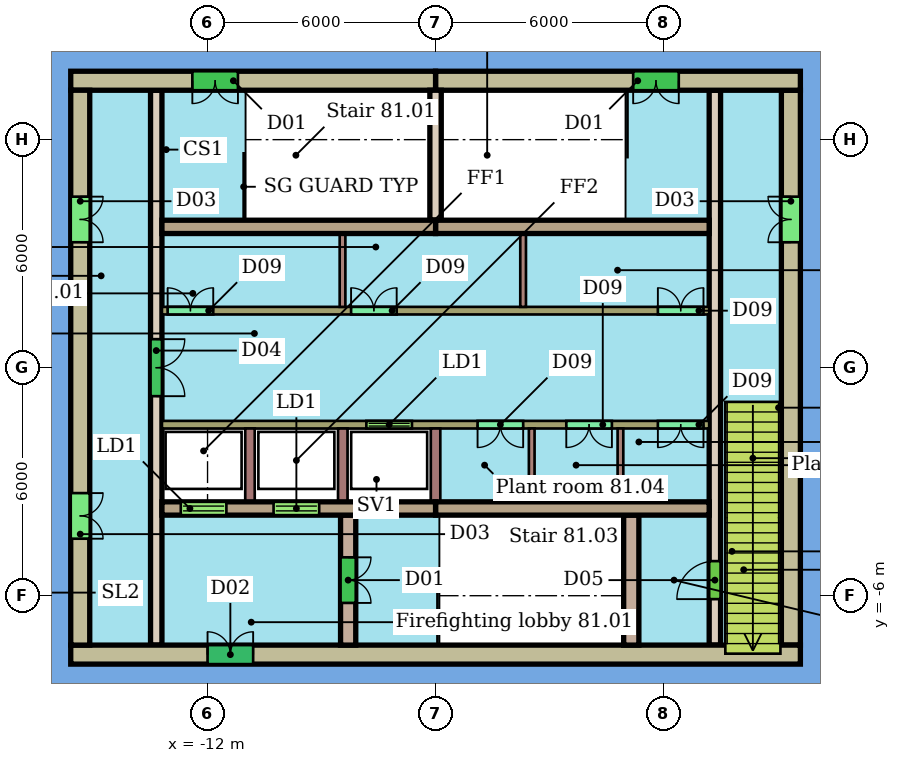
"""IFC4 building model, lengths in metres.
Left out: names, types, materials, properties, quantities, classifications, styles, units other than length and angle.
Written with IfcOpenShell. Run it as: python <this file> out.ifc"""

import sys

from ifc_helpers import new_model, si_unit, direction, frame, frame_2d, origin, place, context, subcontext, project, spatial, rectangle, extrude, element, fill, save


model = new_model("IFC4")
c1 = context("Model", 3, precision=1e-05, world=origin(), true_north=direction((0.0, 1.0)))
c2 = subcontext(c1, "Body", "Model", "MODEL_VIEW")
j1 = project(units=[si_unit("LENGTHUNIT", "METRE"), si_unit("PLANEANGLEUNIT", "RADIAN")], contexts=[c1])
p1 = place(None, origin())
s1 = spatial("IfcSite", under=j1, at=p1, CompositionType="ELEMENT")
p2 = place(p1, origin())
s2 = spatial("IfcBuilding", under=s1, at=p2, CompositionType="ELEMENT")
p3 = place(p2, frame((0.0, 0.0, 325.5)))
s3 = spatial("IfcBuildingStorey", under=s2, at=p3, CompositionType="ELEMENT", Elevation=325.5)
p4 = place(p3, frame((3.6, 7.55, 0.0), z_axis=(0.0, 0.0, 1.0), x_axis=(-1.0, 0.0, 0.0)))
e1 = element("IfcWall", 1, at=p4, inside=s3, PredefinedType="SHEAR", context=c2, shape_type="SweptSolid", body=[
    extrude(rectangle(XDim=9.6, YDim=0.5, at=frame_2d((4.8, 0.0))), origin(), (0.0, 0.0, 1.0), 3.75),
])
p5 = place(p4, frame((3.2, 0.0, 0.0)))
e2 = element("IfcOpeningElement", 2, at=p5, cuts=e1, PredefinedType="OPENING", context=c2, shape_type="SweptSolid", body=[
    extrude(rectangle(XDim=1.2, YDim=2.1, at=frame_2d((0.6, 1.05))), frame((0.0, 0.26, 0.0), z_axis=(0.0, -1.0, 0.0), x_axis=(1.0, 0.0, 0.0)), (0.0, 0.0, 1.0), 0.52),
])
p6 = place(p3, frame((-6.0, 7.55, 0.0), z_axis=(0.0, 0.0, 1.0), x_axis=(-1.0, 0.0, 0.0)))
e3 = element("IfcWall", 3, at=p6, inside=s3, PredefinedType="SHEAR", context=c2, shape_type="SweptSolid", body=[
    extrude(rectangle(XDim=9.6, YDim=0.5, at=frame_2d((4.8, 0.0))), origin(), (0.0, 0.0, 1.0), 3.75),
])
p7 = place(p6, frame((5.2, 0.0, 0.0)))
e4 = element("IfcOpeningElement", 4, at=p7, cuts=e3, PredefinedType="OPENING", context=c2, shape_type="SweptSolid", body=[
    extrude(rectangle(XDim=1.2, YDim=2.1, at=frame_2d((0.6, 1.05))), frame((0.0, 0.26, 0.0), z_axis=(0.0, -1.0, 0.0), x_axis=(1.0, 0.0, 0.0)), (0.0, 0.0, 1.0), 0.52),
])
p8 = place(p3, frame((-15.6, -7.55, 0.0), z_axis=(0.0, 0.0, 1.0), x_axis=(1.0, 0.0, 0.0)))
e5 = element("IfcWall", 5, at=p8, inside=s3, PredefinedType="SHEAR", context=c2, shape_type="SweptSolid", body=[
    extrude(rectangle(XDim=19.2, YDim=0.5, at=frame_2d((9.6, 0.0))), origin(), (0.0, 0.0, 1.0), 3.75),
])
p9 = place(p8, frame((3.6, 0.0, 0.0)))
e6 = element("IfcOpeningElement", 6, at=p9, cuts=e5, PredefinedType="OPENING", context=c2, shape_type="SweptSolid", body=[
    extrude(rectangle(XDim=1.2, YDim=2.1, at=frame_2d((0.6, 1.05))), frame((0.0, 0.26, 0.0), z_axis=(0.0, -1.0, 0.0), x_axis=(1.0, 0.0, 0.0)), (0.0, 0.0, 1.0), 0.52),
])
p10 = place(p3, frame((-15.35, 7.3, 0.0), z_axis=(0.0, 0.0, 1.0), x_axis=(0.0, -1.0, 0.0)))
e7 = element("IfcWall", 7, at=p10, inside=s3, PredefinedType="SHEAR", context=c2, shape_type="SweptSolid", body=[
    extrude(rectangle(XDim=14.6, YDim=0.5, at=frame_2d((7.3, 0.0))), origin(), (0.0, 0.0, 1.0), 3.75),
])
p11 = place(p10, frame((10.6, 0.0, 0.0)))
e8 = element("IfcOpeningElement", 8, at=p11, cuts=e7, PredefinedType="OPENING", context=c2, shape_type="SweptSolid", body=[
    extrude(rectangle(XDim=1.2, YDim=2.1, at=frame_2d((0.6, 1.05))), frame((0.0, 0.26, 0.0), z_axis=(0.0, -1.0, 0.0), x_axis=(1.0, 0.0, 0.0)), (0.0, 0.0, 1.0), 0.52),
])
p12 = place(p10, frame((2.8, 0.0, 0.0)))
e9 = element("IfcOpeningElement", 9, at=p12, cuts=e7, PredefinedType="OPENING", context=c2, shape_type="SweptSolid", body=[
    extrude(rectangle(XDim=1.2, YDim=2.1, at=frame_2d((0.6, 1.05))), frame((0.0, 0.26, 0.0), z_axis=(0.0, -1.0, 0.0), x_axis=(1.0, 0.0, 0.0)), (0.0, 0.0, 1.0), 0.52),
])
p13 = place(p3, frame((3.35, -7.3, 0.0), z_axis=(0.0, 0.0, 1.0), x_axis=(0.0, 1.0, 0.0)))
e10 = element("IfcWall", 10, at=p13, inside=s3, PredefinedType="SHEAR", context=c2, shape_type="SweptSolid", body=[
    extrude(rectangle(XDim=14.6, YDim=0.5, at=frame_2d((7.3, 0.0))), origin(), (0.0, 0.0, 1.0), 3.75),
])
p14 = place(p13, frame((10.6, 0.0, 0.0)))
e11 = element("IfcOpeningElement", 11, at=p14, cuts=e10, PredefinedType="OPENING", context=c2, shape_type="SweptSolid", body=[
    extrude(rectangle(XDim=1.2, YDim=2.1, at=frame_2d((0.6, 1.05))), frame((0.0, 0.26, 0.0), z_axis=(0.0, -1.0, 0.0), x_axis=(1.0, 0.0, 0.0)), (0.0, 0.0, 1.0), 0.52),
])
for number, where, z_axis, x_axis in (
    (12, (-13.2, 3.705, 0.0), (0.0, 0.0, 1.0), (1.0, 0.0, 0.0)),
    (13, (-6.0, 3.705, 0.0), (0.0, 0.0, 1.0), (1.0, 0.0, 0.0)),
):
    element("IfcWall", number, at=place(p3, frame(where, z_axis=z_axis, x_axis=x_axis)), inside=s3, PredefinedType="SHEAR", context=c2, shape_type="SweptSolid", body=[
        extrude(rectangle(XDim=7.2, YDim=0.35, at=frame_2d((3.6, 0.0))), origin(), (0.0, 0.0, 1.0), 3.75),
    ])
p15 = place(p3, frame((-13.2, -3.705, 0.0), z_axis=(0.0, 0.0, 1.0), x_axis=(1.0, 0.0, 0.0)))
e14 = element("IfcWall", 14, at=p15, inside=s3, PredefinedType="SHEAR", context=c2, shape_type="SweptSolid", body=[
    extrude(rectangle(XDim=7.2, YDim=0.35, at=frame_2d((3.6, 0.0))), origin(), (0.0, 0.0, 1.0), 3.75),
])
p16 = place(p15, frame((0.496, 0.0, 0.0)))
e15 = element("IfcOpeningElement", 15, at=p16, cuts=e14, PredefinedType="OPENING", context=c2, shape_type="SweptSolid", body=[
    extrude(rectangle(XDim=1.2, YDim=2.1, at=frame_2d((0.6, 1.05))), frame((0.0, 0.185, 0.0), z_axis=(0.0, -1.0, 0.0), x_axis=(1.0, 0.0, 0.0)), (0.0, 0.0, 1.0), 0.37),
])
p17 = place(p15, frame((2.938, 0.0, 0.0)))
e16 = element("IfcOpeningElement", 16, at=p17, cuts=e14, PredefinedType="OPENING", context=c2, shape_type="SweptSolid", body=[
    extrude(rectangle(XDim=1.2, YDim=2.1, at=frame_2d((0.6, 1.05))), frame((0.0, 0.185, 0.0), z_axis=(0.0, -1.0, 0.0), x_axis=(1.0, 0.0, 0.0)), (0.0, 0.0, 1.0), 0.37),
])
p18 = place(p3, frame((-6.0, -3.705, 0.0), z_axis=(0.0, 0.0, 1.0), x_axis=(1.0, 0.0, 0.0)))
e17 = element("IfcWall", 17, at=p18, inside=s3, PredefinedType="SHEAR", context=c2, shape_type="SweptSolid", body=[
    extrude(rectangle(XDim=7.2, YDim=0.35, at=frame_2d((3.6, 0.0))), origin(), (0.0, 0.0, 1.0), 3.75),
])
p19 = place(p3, frame((-13.35, 7.3, 0.0), z_axis=(0.0, 0.0, 1.0), x_axis=(0.0, -1.0, 0.0)))
e18 = element("IfcWall", 18, at=p19, inside=s3, PredefinedType="SHEAR", context=c2, shape_type="SweptSolid", body=[
    extrude(rectangle(XDim=14.6, YDim=0.3, at=frame_2d((7.3, 0.0))), origin(), (0.0, 0.0, 1.0), 3.75),
])
p20 = place(p19, frame((6.55, 0.0, 0.0)))
e19 = element("IfcOpeningElement", 19, at=p20, cuts=e18, PredefinedType="OPENING", context=c2, shape_type="SweptSolid", body=[
    extrude(rectangle(XDim=1.5, YDim=2.1, at=frame_2d((0.75, 1.05))), frame((0.0, 0.16, 0.0), z_axis=(0.0, -1.0, 0.0), x_axis=(1.0, 0.0, 0.0)), (0.0, 0.0, 1.0), 0.32),
])
p21 = place(p3, frame((1.35, -7.3, 0.0), z_axis=(0.0, 0.0, 1.0), x_axis=(0.0, 1.0, 0.0)))
e20 = element("IfcWall", 20, at=p21, inside=s3, PredefinedType="SHEAR", context=c2, shape_type="SweptSolid", body=[
    extrude(rectangle(XDim=14.6, YDim=0.3, at=frame_2d((7.3, 0.0))), origin(), (0.0, 0.0, 1.0), 3.75),
])
p22 = place(p21, frame((1.21, 0.0, 0.0)))
e21 = element("IfcOpeningElement", 21, at=p22, cuts=e20, PredefinedType="OPENING", context=c2, shape_type="SweptSolid", body=[
    extrude(rectangle(XDim=1.0, YDim=2.1, at=frame_2d((0.5, 1.05))), frame((0.0, 0.16, 0.0), z_axis=(0.0, -1.0, 0.0), x_axis=(1.0, 0.0, 0.0)), (0.0, 0.0, 1.0), 0.32),
])
p23 = place(p3, frame((-13.2, 1.5, 0.0), z_axis=(0.0, 0.0, 1.0), x_axis=(1.0, 0.0, 0.0)))
e22 = element("IfcWall", 22, at=p23, inside=s3, PredefinedType="SHEAR", context=c2, shape_type="SweptSolid", body=[
    extrude(rectangle(XDim=14.4, YDim=0.2, at=frame_2d((7.2, 0.0))), origin(), (0.0, 0.0, 1.0), 3.75),
])
p24 = place(p23, frame((0.15, 0.0, 0.0)))
e23 = element("IfcOpeningElement", 23, at=p24, cuts=e22, PredefinedType="OPENING", context=c2, shape_type="SweptSolid", body=[
    extrude(rectangle(XDim=1.2, YDim=2.4, at=frame_2d((0.6, 1.2))), frame((0.0, 0.11, 0.0), z_axis=(0.0, -1.0, 0.0), x_axis=(1.0, 0.0, 0.0)), (0.0, 0.0, 1.0), 0.22),
])
p25 = place(p23, frame((4.977, 0.0, 0.0)))
e24 = element("IfcOpeningElement", 24, at=p25, cuts=e22, PredefinedType="OPENING", context=c2, shape_type="SweptSolid", body=[
    extrude(rectangle(XDim=1.2, YDim=2.4, at=frame_2d((0.6, 1.2))), frame((0.0, 0.11, 0.0), z_axis=(0.0, -1.0, 0.0), x_axis=(1.0, 0.0, 0.0)), (0.0, 0.0, 1.0), 0.22),
])
p26 = place(p23, frame((13.05, 0.0, 0.0)))
e25 = element("IfcOpeningElement", 25, at=p26, cuts=e22, PredefinedType="OPENING", context=c2, shape_type="SweptSolid", body=[
    extrude(rectangle(XDim=1.2, YDim=2.4, at=frame_2d((0.6, 1.2))), frame((0.0, 0.11, 0.0), z_axis=(0.0, -1.0, 0.0), x_axis=(1.0, 0.0, 0.0)), (0.0, 0.0, 1.0), 0.22),
])
p27 = place(p3, frame((1.2, -1.5, 0.0), z_axis=(0.0, 0.0, 1.0), x_axis=(-1.0, 0.0, 0.0)))
e26 = element("IfcWall", 26, at=p27, inside=s3, PredefinedType="SHEAR", context=c2, shape_type="SweptSolid", body=[
    extrude(rectangle(XDim=14.4, YDim=0.2, at=frame_2d((7.2, 0.0))), origin(), (0.0, 0.0, 1.0), 3.75),
])
p28 = place(p27, frame((7.821, 0.0, 0.0)))
e27 = element("IfcOpeningElement", 27, at=p28, cuts=e26, PredefinedType="OPENING", context=c2, shape_type="SweptSolid", body=[
    extrude(rectangle(XDim=1.2, YDim=2.1, at=frame_2d((0.6, 1.05))), frame((0.0, 0.11, 0.0), z_axis=(0.0, -1.0, 0.0), x_axis=(1.0, 0.0, 0.0)), (0.0, 0.0, 1.0), 0.22),
])
p29 = place(p27, frame((4.895, 0.0, 0.0)))
e28 = element("IfcOpeningElement", 28, at=p29, cuts=e26, PredefinedType="OPENING", context=c2, shape_type="SweptSolid", body=[
    extrude(rectangle(XDim=1.2, YDim=2.4, at=frame_2d((0.6, 1.2))), frame((0.0, 0.11, 0.0), z_axis=(0.0, -1.0, 0.0), x_axis=(1.0, 0.0, 0.0)), (0.0, 0.0, 1.0), 0.22),
])
p30 = place(p27, frame((2.56, 0.0, 0.0)))
e29 = element("IfcOpeningElement", 29, at=p30, cuts=e26, PredefinedType="OPENING", context=c2, shape_type="SweptSolid", body=[
    extrude(rectangle(XDim=1.2, YDim=2.4, at=frame_2d((0.6, 1.2))), frame((0.0, 0.11, 0.0), z_axis=(0.0, -1.0, 0.0), x_axis=(1.0, 0.0, 0.0)), (0.0, 0.0, 1.0), 0.22),
])
p31 = place(p27, frame((0.15, 0.0, 0.0)))
e30 = element("IfcOpeningElement", 30, at=p31, cuts=e26, PredefinedType="OPENING", context=c2, shape_type="SweptSolid", body=[
    extrude(rectangle(XDim=1.2, YDim=2.4, at=frame_2d((0.6, 1.2))), frame((0.0, 0.11, 0.0), z_axis=(0.0, -1.0, 0.0), x_axis=(1.0, 0.0, 0.0)), (0.0, 0.0, 1.0), 0.22),
])
p32 = place(p3, frame((-8.3, -3.88, 0.0), z_axis=(0.0, 0.0, 1.0), x_axis=(0.0, -1.0, 0.0)))
e31 = element("IfcWall", 31, at=p32, inside=s3, PredefinedType="SHEAR", context=c2, shape_type="SweptSolid", body=[
    extrude(rectangle(XDim=3.42, YDim=0.4, at=frame_2d((1.71, 0.0))), origin(), (0.0, 0.0, 1.0), 3.75),
])
p33 = place(p32, frame((1.11, 0.0, 0.0)))
e32 = element("IfcOpeningElement", 32, at=p33, cuts=e31, PredefinedType="OPENING", context=c2, shape_type="SweptSolid", body=[
    extrude(rectangle(XDim=1.2, YDim=2.1, at=frame_2d((0.6, 1.05))), frame((0.0, 0.21, 0.0), z_axis=(0.0, -1.0, 0.0), x_axis=(1.0, 0.0, 0.0)), (0.0, 0.0, 1.0), 0.42),
])
p34 = place(p3, frame((-0.85, -3.88, 0.0), z_axis=(0.0, 0.0, 1.0), x_axis=(0.0, -1.0, 0.0)))
e33 = element("IfcWall", 33, at=p34, inside=s3, PredefinedType="SHEAR", context=c2, shape_type="SweptSolid", body=[
    extrude(rectangle(XDim=3.42, YDim=0.4, at=frame_2d((1.71, 0.0))), origin(), (0.0, 0.0, 1.0), 3.75),
])
p35 = place(p3, frame((-6.0, 3.88, 0.0), z_axis=(0.0, 0.0, 1.0), x_axis=(0.0, 1.0, 0.0)))
e34 = element("IfcWall", 34, at=p35, inside=s3, PredefinedType="SHEAR", context=c2, shape_type="SweptSolid", body=[
    extrude(rectangle(XDim=3.42, YDim=0.3, at=frame_2d((1.71, 0.0))), origin(), (0.0, 0.0, 1.0), 3.75),
])
for number, where, z_axis, x_axis in (
    (35, (-8.448, 1.6, 0.0), (0.0, 0.0, 1.0), (0.0, 1.0, 0.0)),
    (36, (-3.696, 1.6, 0.0), (0.0, 0.0, 1.0), (0.0, 1.0, 0.0)),
):
    element("IfcWall", number, at=place(p3, frame(where, z_axis=z_axis, x_axis=x_axis)), inside=s3, PredefinedType="PARTITIONING", context=c2, shape_type="SweptSolid", body=[
        extrude(rectangle(XDim=1.93, YDim=0.15, at=frame_2d((0.965, 0.0))), origin(), (0.0, 0.0, 1.0), 3.75),
    ])
for number, where, z_axis, x_axis in (
    (37, (-10.883, -1.6, 0.0), (0.0, 0.0, 1.0), (0.0, -1.0, 0.0)),
    (38, (-8.442, -1.6, 0.0), (0.0, 0.0, 1.0), (0.0, -1.0, 0.0)),
    (39, (-6.0, -1.6, 0.0), (0.0, 0.0, 1.0), (0.0, -1.0, 0.0)),
):
    element("IfcWall", number, at=place(p3, frame(where, z_axis=z_axis, x_axis=x_axis)), inside=s3, PredefinedType="SHEAR", context=c2, shape_type="SweptSolid", body=[
        extrude(rectangle(XDim=1.93, YDim=0.25, at=frame_2d((0.965, 0.0))), origin(), (0.0, 0.0, 1.0), 3.75),
    ])
for number, where, z_axis, x_axis in (
    (40, (-3.469, -1.6, 0.0), (0.0, 0.0, 1.0), (0.0, -1.0, 0.0)),
    (41, (-1.135, -1.6, 0.0), (0.0, 0.0, 1.0), (0.0, -1.0, 0.0)),
):
    element("IfcWall", number, at=place(p3, frame(where, z_axis=z_axis, x_axis=x_axis)), inside=s3, PredefinedType="PARTITIONING", context=c2, shape_type="SweptSolid", body=[
        extrude(rectangle(XDim=1.93, YDim=0.15, at=frame_2d((0.965, 0.0))), origin(), (0.0, 0.0, 1.0), 3.75),
    ])
p36 = place(p5, origin())
e42 = element("IfcDoor", 42, at=p36, inside=s3, OperationType="DOUBLE_DOOR_SINGLE_SWING", PredefinedType="NOTDEFINED", context=c2, shape_type="SweptSolid", body=[
    extrude(rectangle(XDim=1.2, YDim=2.1, at=frame_2d((0.6, 1.05))), frame((0.0, 0.025, 0.0), z_axis=(0.0, -1.0, 0.0), x_axis=(1.0, 0.0, 0.0)), (0.0, 0.0, 1.0), 0.05),
])
fill(e2, e42)
p37 = place(p7, origin())
e43 = element("IfcDoor", 43, at=p37, inside=s3, OperationType="DOUBLE_DOOR_SINGLE_SWING", PredefinedType="NOTDEFINED", context=c2, shape_type="SweptSolid", body=[
    extrude(rectangle(XDim=1.2, YDim=2.1, at=frame_2d((0.6, 1.05))), frame((0.0, 0.025, 0.0), z_axis=(0.0, -1.0, 0.0), x_axis=(1.0, 0.0, 0.0)), (0.0, 0.0, 1.0), 0.05),
])
fill(e4, e43)
p38 = place(p9, origin())
e44 = element("IfcDoor", 44, at=p38, inside=s3, OperationType="DOUBLE_DOOR_SINGLE_SWING", PredefinedType="NOTDEFINED", context=c2, shape_type="SweptSolid", body=[
    extrude(rectangle(XDim=1.2, YDim=2.1, at=frame_2d((0.6, 1.05))), frame((0.0, 0.025, 0.0), z_axis=(0.0, -1.0, 0.0), x_axis=(1.0, 0.0, 0.0)), (0.0, 0.0, 1.0), 0.05),
])
fill(e6, e44)
p39 = place(p11, origin())
e45 = element("IfcDoor", 45, at=p39, inside=s3, OperationType="DOUBLE_DOOR_SINGLE_SWING", PredefinedType="NOTDEFINED", context=c2, shape_type="SweptSolid", body=[
    extrude(rectangle(XDim=1.2, YDim=2.1, at=frame_2d((0.6, 1.05))), frame((0.0, 0.025, 0.0), z_axis=(0.0, -1.0, 0.0), x_axis=(1.0, 0.0, 0.0)), (0.0, 0.0, 1.0), 0.05),
])
fill(e8, e45)
p40 = place(p12, origin())
e46 = element("IfcDoor", 46, at=p40, inside=s3, OperationType="DOUBLE_DOOR_SINGLE_SWING", PredefinedType="NOTDEFINED", context=c2, shape_type="SweptSolid", body=[
    extrude(rectangle(XDim=1.2, YDim=2.1, at=frame_2d((0.6, 1.05))), frame((0.0, 0.025, 0.0), z_axis=(0.0, -1.0, 0.0), x_axis=(1.0, 0.0, 0.0)), (0.0, 0.0, 1.0), 0.05),
])
fill(e9, e46)
p41 = place(p14, origin())
e47 = element("IfcDoor", 47, at=p41, inside=s3, OperationType="DOUBLE_DOOR_SINGLE_SWING", PredefinedType="NOTDEFINED", context=c2, shape_type="SweptSolid", body=[
    extrude(rectangle(XDim=1.2, YDim=2.1, at=frame_2d((0.6, 1.05))), frame((0.0, 0.025, 0.0), z_axis=(0.0, -1.0, 0.0), x_axis=(1.0, 0.0, 0.0)), (0.0, 0.0, 1.0), 0.05),
])
fill(e11, e47)
p42 = place(p16, origin())
e48 = element("IfcDoor", 48, at=p42, inside=s3, OperationType="DOUBLE_DOOR_SLIDING", PredefinedType="NOTDEFINED", context=c2, shape_type="SweptSolid", body=[
    extrude(rectangle(XDim=1.2, YDim=2.1, at=frame_2d((0.6, 1.05))), frame((0.0, 0.025, 0.0), z_axis=(0.0, -1.0, 0.0), x_axis=(1.0, 0.0, 0.0)), (0.0, 0.0, 1.0), 0.05),
])
fill(e15, e48)
p43 = place(p17, origin())
e49 = element("IfcDoor", 49, at=p43, inside=s3, OperationType="DOUBLE_DOOR_SLIDING", PredefinedType="NOTDEFINED", context=c2, shape_type="SweptSolid", body=[
    extrude(rectangle(XDim=1.2, YDim=2.1, at=frame_2d((0.6, 1.05))), frame((0.0, 0.025, 0.0), z_axis=(0.0, -1.0, 0.0), x_axis=(1.0, 0.0, 0.0)), (0.0, 0.0, 1.0), 0.05),
])
fill(e16, e49)
p44 = place(p20, origin())
e50 = element("IfcDoor", 50, at=p44, inside=s3, OperationType="DOUBLE_DOOR_SINGLE_SWING", PredefinedType="NOTDEFINED", context=c2, shape_type="SweptSolid", body=[
    extrude(rectangle(XDim=1.5, YDim=2.1, at=frame_2d((0.75, 1.05))), frame((0.0, 0.025, 0.0), z_axis=(0.0, -1.0, 0.0), x_axis=(1.0, 0.0, 0.0)), (0.0, 0.0, 1.0), 0.05),
])
fill(e19, e50)
p45 = place(p22, origin())
e51 = element("IfcDoor", 51, at=p45, inside=s3, OperationType="SINGLE_SWING_LEFT", PredefinedType="NOTDEFINED", context=c2, shape_type="SweptSolid", body=[
    extrude(rectangle(XDim=1.0, YDim=2.1, at=frame_2d((0.5, 1.05))), frame((0.0, 0.025, 0.0), z_axis=(0.0, -1.0, 0.0), x_axis=(1.0, 0.0, 0.0)), (0.0, 0.0, 1.0), 0.05),
])
fill(e21, e51)
p46 = place(p24, origin())
e52 = element("IfcDoor", 52, at=p46, inside=s3, OperationType="DOUBLE_DOOR_SINGLE_SWING", PredefinedType="NOTDEFINED", context=c2, shape_type="SweptSolid", body=[
    extrude(rectangle(XDim=1.2, YDim=2.4, at=frame_2d((0.6, 1.2))), frame((0.0, 0.025, 0.0), z_axis=(0.0, -1.0, 0.0), x_axis=(1.0, 0.0, 0.0)), (0.0, 0.0, 1.0), 0.05),
])
fill(e23, e52)
p47 = place(p25, origin())
e53 = element("IfcDoor", 53, at=p47, inside=s3, OperationType="DOUBLE_DOOR_SINGLE_SWING", PredefinedType="NOTDEFINED", context=c2, shape_type="SweptSolid", body=[
    extrude(rectangle(XDim=1.2, YDim=2.4, at=frame_2d((0.6, 1.2))), frame((0.0, 0.025, 0.0), z_axis=(0.0, -1.0, 0.0), x_axis=(1.0, 0.0, 0.0)), (0.0, 0.0, 1.0), 0.05),
])
fill(e24, e53)
p48 = place(p26, origin())
e54 = element("IfcDoor", 54, at=p48, inside=s3, OperationType="DOUBLE_DOOR_SINGLE_SWING", PredefinedType="NOTDEFINED", context=c2, shape_type="SweptSolid", body=[
    extrude(rectangle(XDim=1.2, YDim=2.4, at=frame_2d((0.6, 1.2))), frame((0.0, 0.025, 0.0), z_axis=(0.0, -1.0, 0.0), x_axis=(1.0, 0.0, 0.0)), (0.0, 0.0, 1.0), 0.05),
])
fill(e25, e54)
p49 = place(p28, origin())
e55 = element("IfcDoor", 55, at=p49, inside=s3, OperationType="DOUBLE_DOOR_SLIDING", PredefinedType="NOTDEFINED", context=c2, shape_type="SweptSolid", body=[
    extrude(rectangle(XDim=1.2, YDim=2.1, at=frame_2d((0.6, 1.05))), frame((0.0, 0.025, 0.0), z_axis=(0.0, -1.0, 0.0), x_axis=(1.0, 0.0, 0.0)), (0.0, 0.0, 1.0), 0.05),
])
fill(e27, e55)
p50 = place(p29, origin())
e56 = element("IfcDoor", 56, at=p50, inside=s3, OperationType="DOUBLE_DOOR_SINGLE_SWING", PredefinedType="NOTDEFINED", context=c2, shape_type="SweptSolid", body=[
    extrude(rectangle(XDim=1.2, YDim=2.4, at=frame_2d((0.6, 1.2))), frame((0.0, 0.025, 0.0), z_axis=(0.0, -1.0, 0.0), x_axis=(1.0, 0.0, 0.0)), (0.0, 0.0, 1.0), 0.05),
])
fill(e28, e56)
p51 = place(p30, origin())
e57 = element("IfcDoor", 57, at=p51, inside=s3, OperationType="DOUBLE_DOOR_SINGLE_SWING", PredefinedType="NOTDEFINED", context=c2, shape_type="SweptSolid", body=[
    extrude(rectangle(XDim=1.2, YDim=2.4, at=frame_2d((0.6, 1.2))), frame((0.0, 0.025, 0.0), z_axis=(0.0, -1.0, 0.0), x_axis=(1.0, 0.0, 0.0)), (0.0, 0.0, 1.0), 0.05),
])
fill(e29, e57)
p52 = place(p31, origin())
e58 = element("IfcDoor", 58, at=p52, inside=s3, OperationType="DOUBLE_DOOR_SINGLE_SWING", PredefinedType="NOTDEFINED", context=c2, shape_type="SweptSolid", body=[
    extrude(rectangle(XDim=1.2, YDim=2.4, at=frame_2d((0.6, 1.2))), frame((0.0, 0.025, 0.0), z_axis=(0.0, -1.0, 0.0), x_axis=(1.0, 0.0, 0.0)), (0.0, 0.0, 1.0), 0.05),
])
fill(e30, e58)
p53 = place(p33, origin())
e59 = element("IfcDoor", 59, at=p53, inside=s3, OperationType="DOUBLE_DOOR_SINGLE_SWING", PredefinedType="NOTDEFINED", context=c2, shape_type="SweptSolid", body=[
    extrude(rectangle(XDim=1.2, YDim=2.1, at=frame_2d((0.6, 1.05))), frame((0.0, 0.025, 0.0), z_axis=(0.0, -1.0, 0.0), x_axis=(1.0, 0.0, 0.0)), (0.0, 0.0, 1.0), 0.05),
])
fill(e32, e59)
save(model, sys.argv[1])
